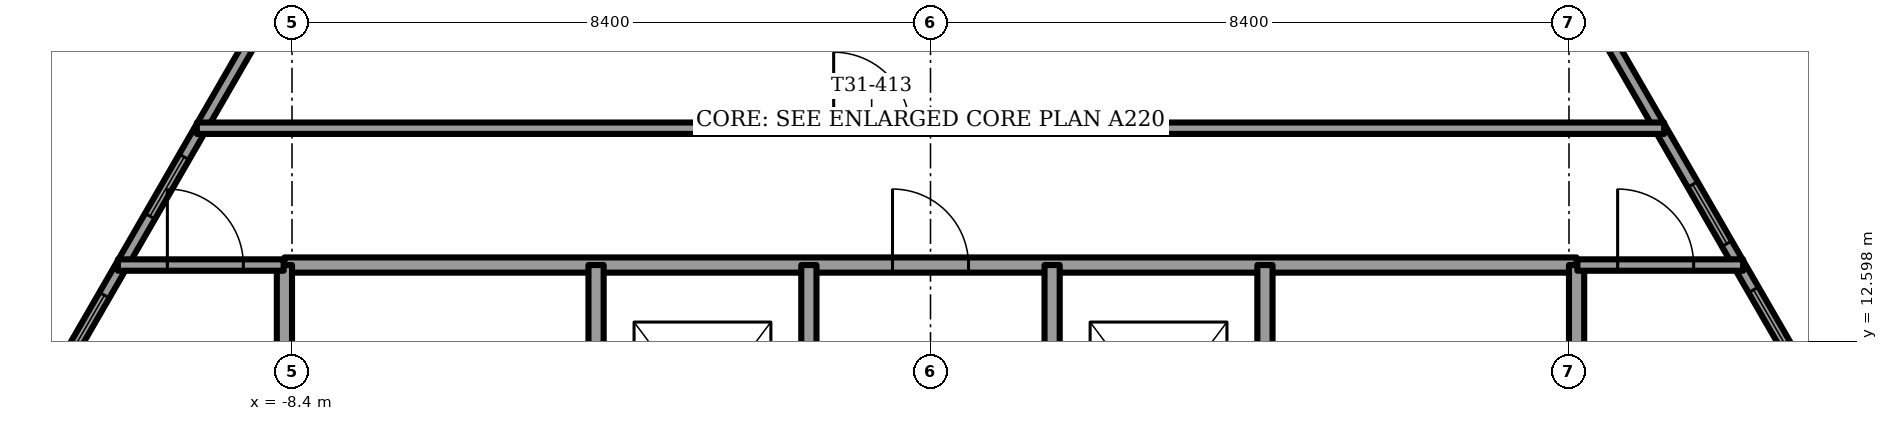
"""IFC4 building model, lengths in metres.
Left out: names, types, materials, properties, quantities, classifications, styles, units other than length and angle.
Written with IfcOpenShell. Run it as: python <this file> out.ifc"""

import sys

from ifc_helpers import new_model, si_unit, direction, frame, frame_2d, origin, place, context, subcontext, project, spatial, rectangle, extrude, element, fill, save


model = new_model("IFC4")
c1 = context("Model", 3, precision=1e-05, world=origin(), true_north=direction((0.0, 1.0)))
c2 = subcontext(c1, "Body", "Model", "MODEL_VIEW")
j1 = project(units=[si_unit("LENGTHUNIT", "METRE"), si_unit("PLANEANGLEUNIT", "RADIAN")], contexts=[c1])
p1 = place(None, origin())
s1 = spatial("IfcSite", under=j1, at=p1, CompositionType="ELEMENT")
p2 = place(p1, origin())
s2 = spatial("IfcBuilding", under=s1, at=p2, CompositionType="ELEMENT")
p3 = place(p2, frame((0.0, 0.0, 127.25)))
s3 = spatial("IfcBuildingStorey", under=s2, at=p3, CompositionType="ELEMENT", Elevation=127.25)
for number, where, z_axis, x_axis in (
    (1, (-10.734, 19.286, 0.0), (0.0, 0.0, 1.0), (-0.5, -0.866, 0.0)),
    (2, (14.163, 13.346, 0.0), (0.0, 0.0, 1.0), (-0.5, 0.866, 0.0)),
):
    element("IfcWall", number, at=place(p3, frame(where, z_axis=z_axis, x_axis=x_axis)), inside=s3, PredefinedType="PARAPET", context=c2, shape_type="SweptSolid", body=[
        extrude(rectangle(XDim=6.859, YDim=0.9, at=frame_2d((3.429, 0.0))), origin(), (0.0, 0.0, 1.0), 1.1),
    ])
p4 = place(p3, frame((-7.642, 18.792, 0.0), z_axis=(0.0, 0.0, 1.0), x_axis=(-0.500001219746, -0.866024699562, 0.0)))
e3 = element("IfcWall", 3, at=p4, inside=s3, PredefinedType="SOLIDWALL", context=c2, shape_type="SweptSolid", body=[
    extrude(rectangle(XDim=22.137, YDim=0.15, at=frame_2d((11.068, 0.0))), origin(), (0.0, 0.0, 1.0), 3.45),
])
p5 = place(p4, frame((4.354, 0.0, 0.15)))
e4 = element("IfcOpeningElement", 4, at=p5, cuts=e3, PredefinedType="OPENING", context=c2, shape_type="SweptSolid", body=[
    extrude(rectangle(XDim=0.9, YDim=2.85, at=frame_2d((0.45, 1.425))), frame((0.0, 0.075, 0.0), z_axis=(0.0, -1.0, 0.0), x_axis=(1.0, 0.0, 0.0)), (0.0, 0.0, 1.0), 0.15),
])
p6 = place(p4, frame((6.454, 0.0, 0.15)))
e5 = element("IfcOpeningElement", 5, at=p6, cuts=e3, PredefinedType="OPENING", context=c2, shape_type="SweptSolid", body=[
    extrude(rectangle(XDim=1.5, YDim=2.85, at=frame_2d((0.75, 1.425))), frame((0.0, 0.075, 0.0), z_axis=(0.0, -1.0, 0.0), x_axis=(1.0, 0.0, 0.0)), (0.0, 0.0, 1.0), 0.15),
])
p7 = place(p4, frame((8.554, 0.0, 0.15)))
e6 = element("IfcOpeningElement", 6, at=p7, cuts=e3, PredefinedType="OPENING", context=c2, shape_type="SweptSolid", body=[
    extrude(rectangle(XDim=0.9, YDim=2.85, at=frame_2d((0.45, 1.425))), frame((0.0, 0.075, 0.0), z_axis=(0.0, -1.0, 0.0), x_axis=(1.0, 0.0, 0.0)), (0.0, 0.0, 1.0), 0.15),
])
p8 = place(p4, frame((12.754, 0.0, 0.15)))
e7 = element("IfcOpeningElement", 7, at=p8, cuts=e3, PredefinedType="OPENING", context=c2, shape_type="SweptSolid", body=[
    extrude(rectangle(XDim=0.9, YDim=2.85, at=frame_2d((0.45, 1.425))), frame((0.0, 0.075, 0.0), z_axis=(0.0, -1.0, 0.0), x_axis=(1.0, 0.0, 0.0)), (0.0, 0.0, 1.0), 0.15),
])
p9 = place(p4, frame((14.449, 0.0, 0.15)))
e8 = element("IfcOpeningElement", 8, at=p9, cuts=e3, PredefinedType="OPENING", context=c2, shape_type="SweptSolid", body=[
    extrude(rectangle(XDim=1.5, YDim=2.85, at=frame_2d((0.75, 1.425))), frame((0.0, 0.075, 0.0), z_axis=(0.0, -1.0, 0.0), x_axis=(1.0, 0.0, 0.0)), (0.0, 0.0, 1.0), 0.15),
])
p10 = place(p4, frame((16.954, 0.0, 0.15)))
e9 = element("IfcOpeningElement", 9, at=p10, cuts=e3, PredefinedType="OPENING", context=c2, shape_type="SweptSolid", body=[
    extrude(rectangle(XDim=1.7, YDim=2.85, at=frame_2d((0.85, 1.425))), frame((0.0, 0.075, 0.0), z_axis=(0.0, -1.0, 0.0), x_axis=(1.0, 0.0, 0.0)), (0.0, 0.0, 1.0), 0.15),
])
p11 = place(p4, frame((19.054, 0.0, 0.0)))
e10 = element("IfcOpeningElement", 10, at=p11, cuts=e3, PredefinedType="OPENING", context=c2, shape_type="SweptSolid", body=[
    extrude(rectangle(XDim=1.5, YDim=2.4, at=frame_2d((0.75, 1.2))), frame((0.0, 0.075, 0.0), z_axis=(0.0, -1.0, 0.0), x_axis=(1.0, 0.0, 0.0)), (0.0, 0.0, 1.0), 0.15),
])
p12 = place(p4, frame((1.021, 0.0, 0.15)))
e11 = element("IfcOpeningElement", 11, at=p12, cuts=e3, PredefinedType="OPENING", context=c2, shape_type="SweptSolid", body=[
    extrude(rectangle(XDim=1.7, YDim=2.73, at=frame_2d((0.85, 1.365))), frame((0.0, 0.075, 0.0), z_axis=(0.0, -1.0, 0.0), x_axis=(1.0, 0.0, 0.0)), (0.0, 0.0, 1.0), 0.15),
])
p13 = place(p3, frame((18.71, -0.378, 0.0), z_axis=(0.0, 0.0, 1.0), x_axis=(-0.500001219746, 0.866024699562, 0.0)))
e12 = element("IfcWall", 12, at=p13, inside=s3, PredefinedType="SOLIDWALL", context=c2, shape_type="SweptSolid", body=[
    extrude(rectangle(XDim=22.137, YDim=0.15, at=frame_2d((11.068, 0.0))), origin(), (0.0, 0.0, 1.0), 3.45),
])
p14 = place(p13, frame((1.583, 0.0, 0.15)))
e13 = element("IfcOpeningElement", 13, at=p14, cuts=e12, PredefinedType="OPENING", context=c2, shape_type="SweptSolid", body=[
    extrude(rectangle(XDim=1.7, YDim=2.85, at=frame_2d((0.85, 1.425))), frame((0.0, 0.075, 0.0), z_axis=(0.0, -1.0, 0.0), x_axis=(1.0, 0.0, 0.0)), (0.0, 0.0, 1.0), 0.15),
])
p15 = place(p13, frame((3.438, 0.0, 0.0)))
e14 = element("IfcOpeningElement", 14, at=p15, cuts=e12, PredefinedType="OPENING", context=c2, shape_type="SweptSolid", body=[
    extrude(rectangle(XDim=1.5, YDim=2.4, at=frame_2d((0.75, 1.2))), frame((0.0, 0.075, 0.0), z_axis=(0.0, -1.0, 0.0), x_axis=(1.0, 0.0, 0.0)), (0.0, 0.0, 1.0), 0.15),
])
p16 = place(p13, frame((6.188, 0.0, 0.15)))
e15 = element("IfcOpeningElement", 15, at=p16, cuts=e12, PredefinedType="OPENING", context=c2, shape_type="SweptSolid", body=[
    extrude(rectangle(XDim=0.9, YDim=2.85, at=frame_2d((0.45, 1.425))), frame((0.0, 0.075, 0.0), z_axis=(0.0, -1.0, 0.0), x_axis=(1.0, 0.0, 0.0)), (0.0, 0.0, 1.0), 0.15),
])
p17 = place(p13, frame((7.883, 0.0, 0.15)))
e16 = element("IfcOpeningElement", 16, at=p17, cuts=e12, PredefinedType="OPENING", context=c2, shape_type="SweptSolid", body=[
    extrude(rectangle(XDim=1.5, YDim=2.85, at=frame_2d((0.75, 1.425))), frame((0.0, 0.075, 0.0), z_axis=(0.0, -1.0, 0.0), x_axis=(1.0, 0.0, 0.0)), (0.0, 0.0, 1.0), 0.15),
])
p18 = place(p13, frame((12.481, 0.0, 0.15)))
e17 = element("IfcOpeningElement", 17, at=p18, cuts=e12, PredefinedType="OPENING", context=c2, shape_type="SweptSolid", body=[
    extrude(rectangle(XDim=0.9, YDim=2.85, at=frame_2d((0.45, 1.425))), frame((0.0, 0.075, 0.0), z_axis=(0.0, -1.0, 0.0), x_axis=(1.0, 0.0, 0.0)), (0.0, 0.0, 1.0), 0.15),
])
p19 = place(p13, frame((10.281, 0.0, 0.15)))
e18 = element("IfcOpeningElement", 18, at=p19, cuts=e12, PredefinedType="OPENING", context=c2, shape_type="SweptSolid", body=[
    extrude(rectangle(XDim=1.5, YDim=2.85, at=frame_2d((0.75, 1.425))), frame((0.0, 0.075, 0.0), z_axis=(0.0, -1.0, 0.0), x_axis=(1.0, 0.0, 0.0)), (0.0, 0.0, 1.0), 0.15),
])
p20 = place(p13, frame((16.465, 0.0, 0.15)))
e19 = element("IfcOpeningElement", 19, at=p20, cuts=e12, PredefinedType="OPENING", context=c2, shape_type="SweptSolid", body=[
    extrude(rectangle(XDim=0.9, YDim=2.85, at=frame_2d((0.45, 1.425))), frame((0.0, 0.075, 0.0), z_axis=(0.0, -1.0, 0.0), x_axis=(1.0, 0.0, 0.0)), (0.0, 0.0, 1.0), 0.15),
])
p21 = place(p13, frame((14.265, 0.0, 0.15)))
e20 = element("IfcOpeningElement", 20, at=p21, cuts=e12, PredefinedType="OPENING", context=c2, shape_type="SweptSolid", body=[
    extrude(rectangle(XDim=1.5, YDim=2.85, at=frame_2d((0.75, 1.425))), frame((0.0, 0.075, 0.0), z_axis=(0.0, -1.0, 0.0), x_axis=(1.0, 0.0, 0.0)), (0.0, 0.0, 1.0), 0.15),
])
p22 = place(p13, frame((19.415, 0.0, 0.15)))
e21 = element("IfcOpeningElement", 21, at=p22, cuts=e12, PredefinedType="OPENING", context=c2, shape_type="SweptSolid", body=[
    extrude(rectangle(XDim=1.7, YDim=2.73, at=frame_2d((0.85, 1.365))), frame((0.0, 0.075, 0.0), z_axis=(0.0, -1.0, 0.0), x_axis=(1.0, 0.0, 0.0)), (0.0, 0.0, 1.0), 0.15),
])
p23 = place(p3, frame((-8.5, 13.6, 0.0), z_axis=(0.0, 0.0, 1.0), x_axis=(1.0, 0.0, 0.0)))
e22 = element("IfcWall", 22, at=p23, inside=s3, PredefinedType="PARTITIONING", context=c2, shape_type="SweptSolid", body=[
    extrude(rectangle(XDim=17.0, YDim=0.2, at=frame_2d((8.5, 0.0))), origin(), (0.0, 0.0, 1.0), 3.45),
])
p24 = place(p23, frame((8.0, 0.0, 0.0)))
e23 = element("IfcOpeningElement", 23, at=p24, cuts=e22, PredefinedType="OPENING", context=c2, shape_type="SweptSolid", body=[
    extrude(rectangle(XDim=1.0, YDim=2.1, at=frame_2d((0.5, 1.05))), frame((0.0, 0.1, 0.0), z_axis=(0.0, -1.0, 0.0), x_axis=(1.0, 0.0, 0.0)), (0.0, 0.0, 1.0), 0.2),
])
p25 = place(p3, frame((-8.5, 9.7, 0.0), z_axis=(0.0, 0.0, 1.0), x_axis=(0.0, 1.0, 0.0)))
e24 = element("IfcWall", 24, at=p25, inside=s3, PredefinedType="PARTITIONING", context=c2, shape_type="SweptSolid", body=[
    extrude(rectangle(XDim=3.9, YDim=0.2, at=frame_2d((1.95, 0.0))), origin(), (0.0, 0.0, 1.0), 3.45),
])
p26 = place(p25, frame((1.35, 0.0, 0.0)))
e25 = element("IfcOpeningElement", 25, at=p26, cuts=e24, PredefinedType="OPENING", context=c2, shape_type="SweptSolid", body=[
    extrude(rectangle(XDim=1.2, YDim=2.1, at=frame_2d((0.6, 1.05))), frame((0.0, 0.1, 0.0), z_axis=(0.0, -1.0, 0.0), x_axis=(1.0, 0.0, 0.0)), (0.0, 0.0, 1.0), 0.2),
])
p27 = place(p3, frame((8.5, 9.7, 0.0), z_axis=(0.0, 0.0, 1.0), x_axis=(0.0, 1.0, 0.0)))
e26 = element("IfcWall", 26, at=p27, inside=s3, PredefinedType="PARTITIONING", context=c2, shape_type="SweptSolid", body=[
    extrude(rectangle(XDim=3.9, YDim=0.2, at=frame_2d((1.95, 0.0))), origin(), (0.0, 0.0, 1.0), 3.45),
])
p28 = place(p27, frame((1.35, 0.0, 0.0)))
e27 = element("IfcOpeningElement", 27, at=p28, cuts=e26, PredefinedType="OPENING", context=c2, shape_type="SweptSolid", body=[
    extrude(rectangle(XDim=1.2, YDim=2.1, at=frame_2d((0.6, 1.05))), frame((0.0, 0.1, 0.0), z_axis=(0.0, -1.0, 0.0), x_axis=(1.0, 0.0, 0.0)), (0.0, 0.0, 1.0), 0.2),
])
p29 = place(p3, frame((-4.4, 9.7, 0.0), z_axis=(0.0, 0.0, 1.0), x_axis=(0.0, 1.0, 0.0)))
e28 = element("IfcWall", 28, at=p29, inside=s3, PredefinedType="PARTITIONING", context=c2, shape_type="SweptSolid", body=[
    extrude(rectangle(XDim=3.9, YDim=0.2, at=frame_2d((1.95, 0.0))), origin(), (0.0, 0.0, 1.0), 3.45),
])
p30 = place(p29, frame((1.35, 0.0, 0.0)))
e29 = element("IfcOpeningElement", 29, at=p30, cuts=e28, PredefinedType="OPENING", context=c2, shape_type="SweptSolid", body=[
    extrude(rectangle(XDim=1.2, YDim=2.1, at=frame_2d((0.6, 1.05))), frame((0.0, 0.1, 0.0), z_axis=(0.0, -1.0, 0.0), x_axis=(1.0, 0.0, 0.0)), (0.0, 0.0, 1.0), 0.2),
])
p31 = place(p3, frame((4.4, 9.7, 0.0), z_axis=(0.0, 0.0, 1.0), x_axis=(0.0, 1.0, 0.0)))
e30 = element("IfcWall", 30, at=p31, inside=s3, PredefinedType="PARTITIONING", context=c2, shape_type="SweptSolid", body=[
    extrude(rectangle(XDim=3.9, YDim=0.2, at=frame_2d((1.95, 0.0))), origin(), (0.0, 0.0, 1.0), 3.45),
])
p32 = place(p31, frame((1.35, 0.0, 0.0)))
e31 = element("IfcOpeningElement", 31, at=p32, cuts=e30, PredefinedType="OPENING", context=c2, shape_type="SweptSolid", body=[
    extrude(rectangle(XDim=1.2, YDim=2.1, at=frame_2d((0.6, 1.05))), frame((0.0, 0.1, 0.0), z_axis=(0.0, -1.0, 0.0), x_axis=(1.0, 0.0, 0.0)), (0.0, 0.0, 1.0), 0.2),
])
for number, where, z_axis, x_axis in (
    (32, (-1.6, 9.7, 0.0), (0.0, 0.0, 1.0), (0.0, 1.0, 0.0)),
    (33, (1.6, 9.7, 0.0), (0.0, 0.0, 1.0), (0.0, 1.0, 0.0)),
):
    element("IfcWall", number, at=place(p3, frame(where, z_axis=z_axis, x_axis=x_axis)), inside=s3, PredefinedType="PARTITIONING", context=c2, shape_type="SweptSolid", body=[
        extrude(rectangle(XDim=3.9, YDim=0.2, at=frame_2d((1.95, 0.0))), origin(), (0.0, 0.0, 1.0), 3.45),
    ])
p33 = place(p3, frame((-10.691, 13.6, 0.0), z_axis=(0.0, 0.0, 1.0), x_axis=(1.0, 0.0, 0.0)))
e34 = element("IfcWall", 34, at=p33, inside=s3, PredefinedType="PARTITIONING", context=c2, shape_type="SweptSolid", body=[
    extrude(rectangle(XDim=2.181, YDim=0.15, at=frame_2d((1.09, 0.0))), origin(), (0.0, 0.0, 1.0), 3.45),
])
p34 = place(p33, frame((0.651, 0.0, 0.0)))
e35 = element("IfcOpeningElement", 35, at=p34, cuts=e34, PredefinedType="OPENING", context=c2, shape_type="SweptSolid", body=[
    extrude(rectangle(XDim=1.0, YDim=2.1, at=frame_2d((0.5, 1.05))), frame((0.0, 0.075, 0.0), z_axis=(0.0, -1.0, 0.0), x_axis=(1.0, 0.0, 0.0)), (0.0, 0.0, 1.0), 0.15),
])
p35 = place(p3, frame((8.51, 13.6, 0.0), z_axis=(0.0, 0.0, 1.0), x_axis=(1.0, 0.0, 0.0)))
e36 = element("IfcWall", 36, at=p35, inside=s3, PredefinedType="PARTITIONING", context=c2, shape_type="SweptSolid", body=[
    extrude(rectangle(XDim=2.181, YDim=0.15, at=frame_2d((1.09, 0.0))), origin(), (0.0, 0.0, 1.0), 3.45),
])
p36 = place(p35, frame((0.53, 0.0, 0.0)))
e37 = element("IfcOpeningElement", 37, at=p36, cuts=e36, PredefinedType="OPENING", context=c2, shape_type="SweptSolid", body=[
    extrude(rectangle(XDim=1.0, YDim=2.1, at=frame_2d((0.5, 1.05))), frame((0.0, 0.075, 0.0), z_axis=(0.0, -1.0, 0.0), x_axis=(1.0, 0.0, 0.0)), (0.0, 0.0, 1.0), 0.15),
])
p37 = place(p3, frame((-9.652, 15.4, 0.0), z_axis=(0.0, 0.0, 1.0), x_axis=(1.0, 0.0, 0.0)))
e38 = element("IfcWall", 38, at=p37, inside=s3, PredefinedType="PARTITIONING", context=c2, shape_type="SweptSolid", body=[
    extrude(rectangle(XDim=19.304, YDim=0.15, at=frame_2d((9.652, 0.0))), origin(), (0.0, 0.0, 1.0), 3.45),
])
p38 = place(p37, frame((8.378, 0.0, 0.0)))
e39 = element("IfcOpeningElement", 39, at=p38, cuts=e38, PredefinedType="OPENING", context=c2, shape_type="SweptSolid", body=[
    extrude(rectangle(XDim=1.0, YDim=2.1, at=frame_2d((0.5, 1.05))), frame((0.0, 0.075, 0.0), z_axis=(0.0, -1.0, 0.0), x_axis=(1.0, 0.0, 0.0)), (0.0, 0.0, 1.0), 0.15),
])
p39 = place(p5, origin())
e40 = element("IfcWindow", 40, at=p39, inside=s3, PartitioningType="SINGLE_PANEL", PredefinedType="WINDOW", context=c2, shape_type="SweptSolid", body=[
    extrude(rectangle(XDim=0.9, YDim=2.85, at=frame_2d((0.45, 1.425))), frame((0.0, 0.03, 0.0), z_axis=(0.0, -1.0, 0.0), x_axis=(1.0, 0.0, 0.0)), (0.0, 0.0, 1.0), 0.06),
])
fill(e4, e40)
p40 = place(p6, origin())
e41 = element("IfcWindow", 41, at=p40, inside=s3, PartitioningType="SINGLE_PANEL", PredefinedType="WINDOW", context=c2, shape_type="SweptSolid", body=[
    extrude(rectangle(XDim=1.5, YDim=2.85, at=frame_2d((0.75, 1.425))), frame((0.0, 0.03, 0.0), z_axis=(0.0, -1.0, 0.0), x_axis=(1.0, 0.0, 0.0)), (0.0, 0.0, 1.0), 0.06),
])
fill(e5, e41)
p41 = place(p20, origin())
e42 = element("IfcWindow", 42, at=p41, inside=s3, PartitioningType="SINGLE_PANEL", PredefinedType="WINDOW", context=c2, shape_type="SweptSolid", body=[
    extrude(rectangle(XDim=0.9, YDim=2.85, at=frame_2d((0.45, 1.425))), frame((0.0, 0.03, 0.0), z_axis=(0.0, -1.0, 0.0), x_axis=(1.0, 0.0, 0.0)), (0.0, 0.0, 1.0), 0.06),
])
fill(e19, e42)
p42 = place(p21, origin())
e43 = element("IfcWindow", 43, at=p42, inside=s3, PartitioningType="SINGLE_PANEL", PredefinedType="WINDOW", context=c2, shape_type="SweptSolid", body=[
    extrude(rectangle(XDim=1.5, YDim=2.85, at=frame_2d((0.75, 1.425))), frame((0.0, 0.03, 0.0), z_axis=(0.0, -1.0, 0.0), x_axis=(1.0, 0.0, 0.0)), (0.0, 0.0, 1.0), 0.06),
])
fill(e20, e43)
p43 = place(p24, origin())
e44 = element("IfcDoor", 44, at=p43, inside=s3, OperationType="SINGLE_SWING_LEFT", PredefinedType="DOOR", context=c2, shape_type="SweptSolid", body=[
    extrude(rectangle(XDim=1.0, YDim=2.1, at=frame_2d((0.5, 1.05))), frame((0.0, 0.025, 0.0), z_axis=(0.0, -1.0, 0.0), x_axis=(1.0, 0.0, 0.0)), (0.0, 0.0, 1.0), 0.05),
])
fill(e23, e44)
p44 = place(p38, origin())
e45 = element("IfcDoor", 45, at=p44, inside=s3, OperationType="SINGLE_SWING_LEFT", PredefinedType="DOOR", context=c2, shape_type="SweptSolid", body=[
    extrude(rectangle(XDim=1.0, YDim=2.1, at=frame_2d((0.5, 1.05))), frame((0.0, 0.025, 0.0), z_axis=(0.0, -1.0, 0.0), x_axis=(1.0, 0.0, 0.0)), (0.0, 0.0, 1.0), 0.05),
])
fill(e39, e45)
p45 = place(p34, origin())
e46 = element("IfcDoor", 46, at=p45, inside=s3, OperationType="SINGLE_SWING_RIGHT", PredefinedType="DOOR", context=c2, shape_type="SweptSolid", body=[
    extrude(rectangle(XDim=1.0, YDim=2.1, at=frame_2d((0.5, 1.05))), frame((0.0, 0.025, 0.0), z_axis=(0.0, -1.0, 0.0), x_axis=(1.0, 0.0, 0.0)), (0.0, 0.0, 1.0), 0.05),
])
fill(e35, e46)
p46 = place(p36, origin())
e47 = element("IfcDoor", 47, at=p46, inside=s3, OperationType="SINGLE_SWING_LEFT", PredefinedType="DOOR", context=c2, shape_type="SweptSolid", body=[
    extrude(rectangle(XDim=1.0, YDim=2.1, at=frame_2d((0.5, 1.05))), frame((0.0, 0.025, 0.0), z_axis=(0.0, -1.0, 0.0), x_axis=(1.0, 0.0, 0.0)), (0.0, 0.0, 1.0), 0.05),
])
fill(e37, e47)
save(model, sys.argv[1])
